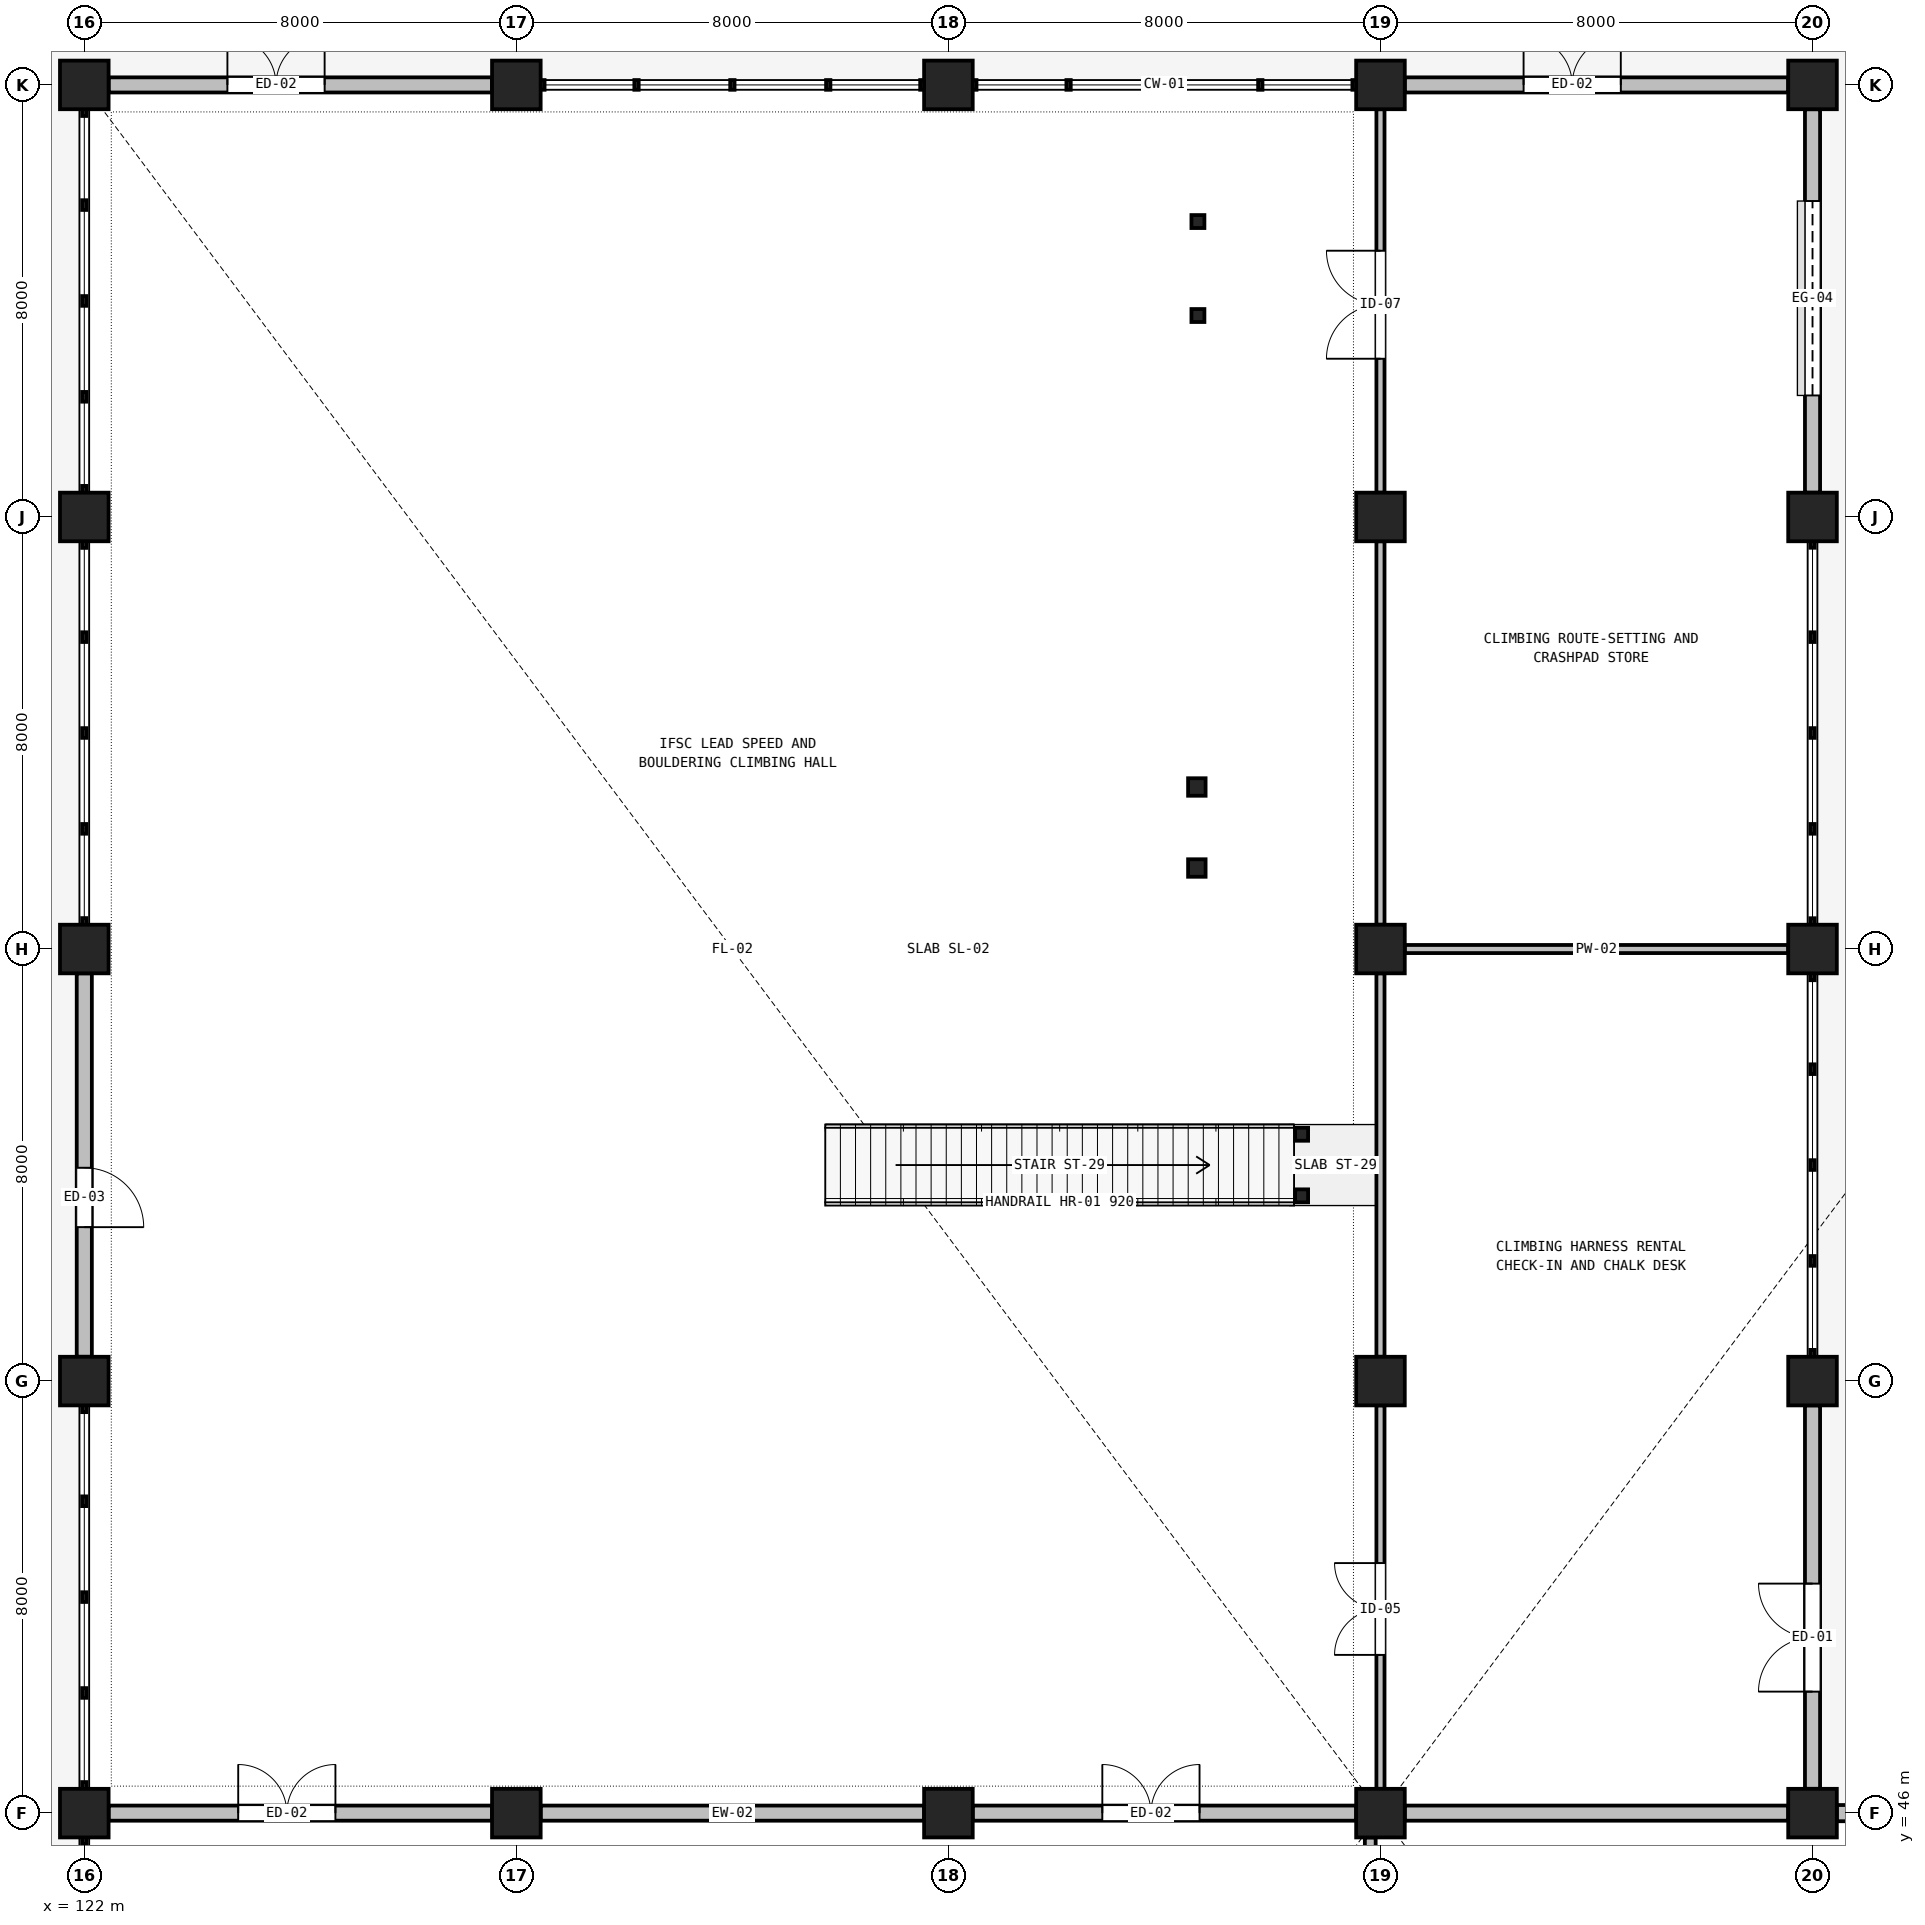
"""IFC4 building model, lengths in metres.
Left out: names, types, materials, properties, quantities, classifications, styles, units other than length and angle.
Written with IfcOpenShell. Run it as: python <this file> out.ifc"""

import sys

from ifc_helpers import new_model, si_unit, direction, frame, frame_2d, origin, origin_2d, place, context, subcontext, project, spatial, rectangle, hollow_circle, i_section, extrude, element, fill, save


model = new_model("IFC4")
c1 = context("Model", 3, precision=1e-05, world=origin(), true_north=direction((0.0, 1.0)))
c2 = subcontext(c1, "Body", "Model", "MODEL_VIEW")
j1 = project(units=[si_unit("LENGTHUNIT", "METRE"), si_unit("PLANEANGLEUNIT", "RADIAN")], contexts=[c1])
p1 = place(None, origin())
s1 = spatial("IfcSite", under=j1, at=p1, CompositionType="ELEMENT")
p2 = place(p1, origin())
s2 = spatial("IfcBuilding", under=s1, at=p2, CompositionType="ELEMENT")
p3 = place(p2, origin())
s3 = spatial("IfcBuildingStorey", under=s2, at=p3, CompositionType="ELEMENT", Elevation=0.0)
for number, where, z_axis, x_axis in (
    (1, (122.0, 46.0, 0.0), (0.0, 0.0, 1.0), (1.0, 0.0, 0.0)),
    (2, (122.0, 54.0, 0.0), (0.0, 0.0, 1.0), (1.0, 0.0, 0.0)),
    (3, (122.0, 62.0, 0.0), (0.0, 0.0, 1.0), (1.0, 0.0, 0.0)),
    (4, (122.0, 70.0, 0.0), (0.0, 0.0, 1.0), (1.0, 0.0, 0.0)),
    (5, (122.0, 78.0, 0.0), (0.0, 0.0, 1.0), (1.0, 0.0, 0.0)),
    (6, (130.0, 46.0, 0.0), (0.0, 0.0, 1.0), (1.0, 0.0, 0.0)),
    (7, (130.0, 78.0, 0.0), (0.0, 0.0, 1.0), (1.0, 0.0, 0.0)),
    (8, (138.0, 46.0, 0.0), (0.0, 0.0, 1.0), (1.0, 0.0, 0.0)),
    (9, (138.0, 78.0, 0.0), (0.0, 0.0, 1.0), (1.0, 0.0, 0.0)),
    (10, (146.0, 46.0, 0.0), (0.0, 0.0, 1.0), (1.0, 0.0, 0.0)),
    (11, (146.0, 54.0, 0.0), (0.0, 0.0, 1.0), (1.0, 0.0, 0.0)),
    (12, (146.0, 62.0, 0.0), (0.0, 0.0, 1.0), (1.0, 0.0, 0.0)),
    (13, (146.0, 70.0, 0.0), (0.0, 0.0, 1.0), (1.0, 0.0, 0.0)),
    (14, (146.0, 78.0, 0.0), (0.0, 0.0, 1.0), (1.0, 0.0, 0.0)),
    (15, (154.0, 46.0, 0.0), (0.0, 0.0, 1.0), (1.0, 0.0, 0.0)),
    (16, (154.0, 54.0, 0.0), (0.0, 0.0, 1.0), (1.0, 0.0, 0.0)),
    (17, (154.0, 62.0, 0.0), (0.0, 0.0, 1.0), (1.0, 0.0, 0.0)),
    (18, (154.0, 70.0, 0.0), (0.0, 0.0, 1.0), (1.0, 0.0, 0.0)),
    (19, (154.0, 78.0, 0.0), (0.0, 0.0, 1.0), (1.0, 0.0, 0.0)),
):
    element("IfcColumn", number, at=place(p3, frame(where, z_axis=z_axis, x_axis=x_axis)), inside=s3, PredefinedType="COLUMN", context=c2, shape_type="SweptSolid", body=[
        extrude(rectangle(XDim=0.9, YDim=0.9, at=origin_2d()), origin(), (0.0, 0.0, 1.0), 5.4),
    ])
p4 = place(p3, frame((122.45, 46.0, 0.0), z_axis=(0.0, 0.0, 1.0), x_axis=(1.0, 0.0, 0.0)))
e20 = element("IfcWall", 20, at=p4, inside=s3, PredefinedType="SOLIDWALL", context=c2, shape_type="SweptSolid", body=[
    extrude(rectangle(XDim=7.1, YDim=0.28, at=frame_2d((3.55, 0.0))), origin(), (0.0, 0.0, 1.0), 4.34),
])
p5 = place(p4, frame((2.4, 0.0, 0.0)))
e21 = element("IfcOpeningElement", 21, at=p5, cuts=e20, PredefinedType="OPENING", context=c2, shape_type="SweptSolid", body=[
    extrude(rectangle(XDim=1.8, YDim=2.3, at=frame_2d((0.9, 1.15))), frame((0.0, 0.15, 0.0), z_axis=(0.0, -1.0, 0.0), x_axis=(1.0, 0.0, 0.0)), (0.0, 0.0, 1.0), 0.3),
])
p6 = place(p3, frame((130.45, 46.0, 0.0), z_axis=(0.0, 0.0, 1.0), x_axis=(1.0, 0.0, 0.0)))
e22 = element("IfcWall", 22, at=p6, inside=s3, PredefinedType="SOLIDWALL", context=c2, shape_type="SweptSolid", body=[
    extrude(rectangle(XDim=7.1, YDim=0.28, at=frame_2d((3.55, 0.0))), origin(), (0.0, 0.0, 1.0), 4.34),
])
p7 = place(p3, frame((138.45, 46.0, 0.0), z_axis=(0.0, 0.0, 1.0), x_axis=(1.0, 0.0, 0.0)))
e23 = element("IfcWall", 23, at=p7, inside=s3, PredefinedType="SOLIDWALL", context=c2, shape_type="SweptSolid", body=[
    extrude(rectangle(XDim=7.1, YDim=0.28, at=frame_2d((3.55, 0.0))), origin(), (0.0, 0.0, 1.0), 4.42),
])
p8 = place(p7, frame((2.4, 0.0, 0.0)))
e24 = element("IfcOpeningElement", 24, at=p8, cuts=e23, PredefinedType="OPENING", context=c2, shape_type="SweptSolid", body=[
    extrude(rectangle(XDim=1.8, YDim=2.3, at=frame_2d((0.9, 1.15))), frame((0.0, 0.15, 0.0), z_axis=(0.0, -1.0, 0.0), x_axis=(1.0, 0.0, 0.0)), (0.0, 0.0, 1.0), 0.3),
])
p9 = place(p3, frame((146.45, 46.0, 0.0), z_axis=(0.0, 0.0, 1.0), x_axis=(1.0, 0.0, 0.0)))
e25 = element("IfcWall", 25, at=p9, inside=s3, PredefinedType="SOLIDWALL", context=c2, shape_type="SweptSolid", body=[
    extrude(rectangle(XDim=7.1, YDim=0.28, at=frame_2d((3.55, 0.0))), origin(), (0.0, 0.0, 1.0), 4.36),
])
p10 = place(p3, frame((154.45, 46.0, 0.0), z_axis=(0.0, 0.0, 1.0), x_axis=(1.0, 0.0, 0.0)))
e26 = element("IfcWall", 26, at=p10, inside=s3, PredefinedType="SOLIDWALL", context=c2, shape_type="SweptSolid", body=[
    extrude(rectangle(XDim=7.2, YDim=0.3, at=frame_2d((3.6, 0.0))), origin(), (0.0, 0.0, 1.0), 4.29),
])
p11 = place(p10, frame((1.8, 0.0, 0.0)))
e27 = element("IfcOpeningElement", 27, at=p11, cuts=e26, PredefinedType="OPENING", context=c2, shape_type="SweptSolid", body=[
    extrude(rectangle(XDim=3.0, YDim=2.6, at=frame_2d((1.5, 1.3))), frame((0.0, 0.16, 0.0), z_axis=(0.0, -1.0, 0.0), x_axis=(1.0, 0.0, 0.0)), (0.0, 0.0, 1.0), 0.32),
])
p12 = place(p3, frame((122.45, 78.0, 0.0), z_axis=(0.0, 0.0, 1.0), x_axis=(1.0, 0.0, 0.0)))
e28 = element("IfcWall", 28, at=p12, inside=s3, PredefinedType="SOLIDWALL", context=c2, shape_type="SweptSolid", body=[
    extrude(rectangle(XDim=7.1, YDim=0.28, at=frame_2d((3.55, 0.0))), origin(), (0.0, 0.0, 1.0), 4.39),
])
p13 = place(p12, frame((2.2, 0.0, 0.0)))
e29 = element("IfcOpeningElement", 29, at=p13, cuts=e28, PredefinedType="OPENING", context=c2, shape_type="SweptSolid", body=[
    extrude(rectangle(XDim=1.8, YDim=2.3, at=frame_2d((0.9, 1.15))), frame((0.0, 0.15, 0.0), z_axis=(0.0, -1.0, 0.0), x_axis=(1.0, 0.0, 0.0)), (0.0, 0.0, 1.0), 0.3),
])
p14 = place(p3, frame((146.45, 78.0, 0.0), z_axis=(0.0, 0.0, 1.0), x_axis=(1.0, 0.0, 0.0)))
e30 = element("IfcWall", 30, at=p14, inside=s3, PredefinedType="SOLIDWALL", context=c2, shape_type="SweptSolid", body=[
    extrude(rectangle(XDim=7.1, YDim=0.28, at=frame_2d((3.55, 0.0))), origin(), (0.0, 0.0, 1.0), 4.34),
])
p15 = place(p14, frame((2.2, 0.0, 0.0)))
e31 = element("IfcOpeningElement", 31, at=p15, cuts=e30, PredefinedType="OPENING", context=c2, shape_type="SweptSolid", body=[
    extrude(rectangle(XDim=1.8, YDim=2.3, at=frame_2d((0.9, 1.15))), frame((0.0, 0.15, 0.0), z_axis=(0.0, -1.0, 0.0), x_axis=(1.0, 0.0, 0.0)), (0.0, 0.0, 1.0), 0.3),
])
p16 = place(p3, frame((154.0, 46.45, 0.0), z_axis=(0.0, 0.0, 1.0), x_axis=(0.0, 1.0, 0.0)))
e32 = element("IfcWall", 32, at=p16, inside=s3, PredefinedType="SOLIDWALL", context=c2, shape_type="SweptSolid", body=[
    extrude(rectangle(XDim=7.1, YDim=0.28, at=frame_2d((3.55, 0.0))), origin(), (0.0, 0.0, 1.0), 4.14),
])
p17 = place(p16, frame((1.8, 0.0, 0.0)))
e33 = element("IfcOpeningElement", 33, at=p17, cuts=e32, PredefinedType="OPENING", context=c2, shape_type="SweptSolid", body=[
    extrude(rectangle(XDim=2.0, YDim=2.4, at=frame_2d((1.0, 1.2))), frame((0.0, 0.15, 0.0), z_axis=(0.0, -1.0, 0.0), x_axis=(1.0, 0.0, 0.0)), (0.0, 0.0, 1.0), 0.3),
])
p18 = place(p3, frame((122.0, 54.45, 0.0), z_axis=(0.0, 0.0, 1.0), x_axis=(0.0, 1.0, 0.0)))
e34 = element("IfcWall", 34, at=p18, inside=s3, PredefinedType="SOLIDWALL", context=c2, shape_type="SweptSolid", body=[
    extrude(rectangle(XDim=7.1, YDim=0.28, at=frame_2d((3.55, 0.0))), origin(), (0.0, 0.0, 1.0), 4.14),
])
p19 = place(p18, frame((2.4, 0.0, 0.0)))
e35 = element("IfcOpeningElement", 35, at=p19, cuts=e34, PredefinedType="OPENING", context=c2, shape_type="SweptSolid", body=[
    extrude(rectangle(XDim=1.1, YDim=2.2, at=frame_2d((0.55, 1.1))), frame((0.0, 0.15, 0.0), z_axis=(0.0, -1.0, 0.0), x_axis=(1.0, 0.0, 0.0)), (0.0, 0.0, 1.0), 0.3),
])
p20 = place(p3, frame((154.0, 70.45, 0.0), z_axis=(0.0, 0.0, 1.0), x_axis=(0.0, 1.0, 0.0)))
e36 = element("IfcWall", 36, at=p20, inside=s3, PredefinedType="SOLIDWALL", context=c2, shape_type="SweptSolid", body=[
    extrude(rectangle(XDim=7.1, YDim=0.28, at=frame_2d((3.55, 0.0))), origin(), (0.0, 0.0, 1.0), 4.49),
])
p21 = place(p20, frame((1.8, 0.0, 0.0)))
e37 = element("IfcOpeningElement", 37, at=p21, cuts=e36, PredefinedType="OPENING", context=c2, shape_type="SweptSolid", body=[
    extrude(rectangle(XDim=3.6, YDim=3.2, at=frame_2d((1.8, 1.6))), frame((0.0, 0.15, 0.0), z_axis=(0.0, -1.0, 0.0), x_axis=(1.0, 0.0, 0.0)), (0.0, 0.0, 1.0), 0.3),
])
for number, where, z_axis, x_axis in (
    (38, (142.6, 63.5, 0.0), (0.0, 0.0, 1.0), (1.0, 0.0, 0.0)),
    (39, (142.6, 65.0, 0.0), (0.0, 0.0, 1.0), (1.0, 0.0, 0.0)),
):
    element("IfcColumn", number, at=place(p3, frame(where, z_axis=z_axis, x_axis=x_axis)), inside=s3, PredefinedType="COLUMN", context=c2, shape_type="SweptSolid", body=[
        extrude(hollow_circle(Radius=0.162, WallThickness=0.012, at=origin_2d()), origin(), (0.0, 0.0, 1.0), 5.2),
    ])
for number, where, z_axis, x_axis in (
    (40, (144.54, 57.43, 0.0), (0.0, 0.0, 1.0), (1.0, 0.0, 0.0)),
    (41, (144.54, 58.57, 0.0), (0.0, 0.0, 1.0), (1.0, 0.0, 0.0)),
):
    element("IfcColumn", number, at=place(p3, frame(where, z_axis=z_axis, x_axis=x_axis)), inside=s3, PredefinedType="COLUMN", context=c2, shape_type="SweptSolid", body=[
        extrude(i_section(OverallWidth=0.24, OverallDepth=0.24, WebThickness=0.01, FlangeThickness=0.017, FilletRadius=0.021, at=origin_2d()), origin(), (0.0, 0.0, 1.0), 5.22),
    ])
for number, where, z_axis, x_axis in (
    (42, (142.62, 73.73, 0.0), (0.0, 0.0, 1.0), (1.0, 0.0, 0.0)),
    (43, (142.62, 75.47, 0.0), (0.0, 0.0, 1.0), (1.0, 0.0, 0.0)),
):
    element("IfcColumn", number, at=place(p3, frame(where, z_axis=z_axis, x_axis=x_axis)), inside=s3, PredefinedType="COLUMN", context=c2, shape_type="SweptSolid", body=[
        extrude(i_section(OverallWidth=0.24, OverallDepth=0.24, WebThickness=0.01, FlangeThickness=0.017, FilletRadius=0.021, at=origin_2d()), origin(), (0.0, 0.0, 1.0), 5.4),
    ])
p22 = place(p3, frame((145.811, 38.2, 0.0), z_axis=(0.0, 0.0, 1.0), x_axis=(0.0, 1.0, 0.0)))
e44 = element("IfcWall", 44, at=p22, inside=s3, PredefinedType="PARTITIONING", context=c2, shape_type="SweptSolid", body=[
    extrude(rectangle(XDim=7.35, YDim=0.2, at=frame_2d((3.675, 0.0))), origin(), (0.0, 0.0, 1.0), 5.1),
])
p23 = place(p3, frame((146.0, 46.45, 0.0), z_axis=(0.0, 0.0, 1.0), x_axis=(0.0, 1.0, 0.0)))
e45 = element("IfcWall", 45, at=p23, inside=s3, PredefinedType="PARTITIONING", context=c2, shape_type="SweptSolid", body=[
    extrude(rectangle(XDim=7.1, YDim=0.15, at=frame_2d((3.55, 0.0))), origin(), (0.0, 0.0, 1.0), 4.64),
])
p24 = place(p23, frame((2.48, 0.0, 0.0)))
e46 = element("IfcOpeningElement", 46, at=p24, cuts=e45, PredefinedType="OPENING", context=c2, shape_type="SweptSolid", body=[
    extrude(rectangle(XDim=1.7, YDim=2.25, at=frame_2d((0.85, 1.125))), frame((0.0, 0.085, 0.0), z_axis=(0.0, -1.0, 0.0), x_axis=(1.0, 0.0, 0.0)), (0.0, 0.0, 1.0), 0.17),
])
p25 = place(p3, frame((146.0, 54.45, 0.0), z_axis=(0.0, 0.0, 1.0), x_axis=(0.0, 1.0, 0.0)))
e47 = element("IfcWall", 47, at=p25, inside=s3, PredefinedType="PARTITIONING", context=c2, shape_type="SweptSolid", body=[
    extrude(rectangle(XDim=7.1, YDim=0.15, at=frame_2d((3.55, 0.0))), origin(), (0.0, 0.0, 1.0), 4.54),
])
p26 = place(p3, frame((146.0, 62.45, 0.0), z_axis=(0.0, 0.0, 1.0), x_axis=(0.0, 1.0, 0.0)))
e48 = element("IfcWall", 48, at=p26, inside=s3, PredefinedType="PARTITIONING", context=c2, shape_type="SweptSolid", body=[
    extrude(rectangle(XDim=7.1, YDim=0.15, at=frame_2d((3.55, 0.0))), origin(), (0.0, 0.0, 1.0), 4.44),
])
p27 = place(p3, frame((146.0, 70.45, 0.0), z_axis=(0.0, 0.0, 1.0), x_axis=(0.0, 1.0, 0.0)))
e49 = element("IfcWall", 49, at=p27, inside=s3, PredefinedType="PARTITIONING", context=c2, shape_type="SweptSolid", body=[
    extrude(rectangle(XDim=7.1, YDim=0.15, at=frame_2d((3.55, 0.0))), origin(), (0.0, 0.0, 1.0), 4.34),
])
p28 = place(p27, frame((2.48, 0.0, 0.0)))
e50 = element("IfcOpeningElement", 50, at=p28, cuts=e49, PredefinedType="OPENING", context=c2, shape_type="SweptSolid", body=[
    extrude(rectangle(XDim=2.0, YDim=2.4, at=frame_2d((1.0, 1.2))), frame((0.0, 0.085, 0.0), z_axis=(0.0, -1.0, 0.0), x_axis=(1.0, 0.0, 0.0)), (0.0, 0.0, 1.0), 0.17),
])
p29 = place(p3, frame((146.45, 62.0, 0.0), z_axis=(0.0, 0.0, 1.0), x_axis=(1.0, 0.0, 0.0)))
e51 = element("IfcWall", 51, at=p29, inside=s3, PredefinedType="PARTITIONING", context=c2, shape_type="SweptSolid", body=[
    extrude(rectangle(XDim=7.1, YDim=0.15, at=frame_2d((3.55, 0.0))), origin(), (0.0, 0.0, 1.0), 4.34),
])
p30 = place(p5, origin())
e52 = element("IfcDoor", 52, at=p30, inside=s3, OperationType="DOUBLE_DOOR_SINGLE_SWING", PredefinedType="DOOR", context=c2, shape_type="SweptSolid", body=[
    extrude(rectangle(XDim=1.8, YDim=2.3, at=frame_2d((0.9, 1.15))), frame((0.0, 0.025, 0.0), z_axis=(0.0, -1.0, 0.0), x_axis=(1.0, 0.0, 0.0)), (0.0, 0.0, 1.0), 0.05),
])
fill(e21, e52)
p31 = place(p8, origin())
e53 = element("IfcDoor", 53, at=p31, inside=s3, OperationType="DOUBLE_DOOR_SINGLE_SWING", PredefinedType="DOOR", context=c2, shape_type="SweptSolid", body=[
    extrude(rectangle(XDim=1.8, YDim=2.3, at=frame_2d((0.9, 1.15))), frame((0.0, 0.025, 0.0), z_axis=(0.0, -1.0, 0.0), x_axis=(1.0, 0.0, 0.0)), (0.0, 0.0, 1.0), 0.05),
])
fill(e24, e53)
p32 = place(p13, origin())
e54 = element("IfcDoor", 54, at=p32, inside=s3, OperationType="DOUBLE_DOOR_SINGLE_SWING", PredefinedType="DOOR", context=c2, shape_type="SweptSolid", body=[
    extrude(rectangle(XDim=1.8, YDim=2.3, at=frame_2d((0.9, 1.15))), frame((0.0, 0.025, 0.0), z_axis=(0.0, -1.0, 0.0), x_axis=(1.0, 0.0, 0.0)), (0.0, 0.0, 1.0), 0.05),
])
fill(e29, e54)
p33 = place(p15, origin())
e55 = element("IfcDoor", 55, at=p33, inside=s3, OperationType="DOUBLE_DOOR_SINGLE_SWING", PredefinedType="DOOR", context=c2, shape_type="SweptSolid", body=[
    extrude(rectangle(XDim=1.8, YDim=2.3, at=frame_2d((0.9, 1.15))), frame((0.0, 0.025, 0.0), z_axis=(0.0, -1.0, 0.0), x_axis=(1.0, 0.0, 0.0)), (0.0, 0.0, 1.0), 0.05),
])
fill(e31, e55)
p34 = place(p17, origin())
e56 = element("IfcDoor", 56, at=p34, inside=s3, OperationType="DOUBLE_DOOR_SINGLE_SWING", PredefinedType="DOOR", context=c2, shape_type="SweptSolid", body=[
    extrude(rectangle(XDim=2.0, YDim=2.4, at=frame_2d((1.0, 1.2))), frame((0.0, 0.025, 0.0), z_axis=(0.0, -1.0, 0.0), x_axis=(1.0, 0.0, 0.0)), (0.0, 0.0, 1.0), 0.05),
])
fill(e33, e56)
p35 = place(p19, frame((1.1, 0.0, 0.0), z_axis=(0.0, 0.0, 1.0), x_axis=(-1.0, 0.0, 0.0)))
e57 = element("IfcDoor", 57, at=p35, inside=s3, OperationType="SINGLE_SWING_LEFT", PredefinedType="DOOR", context=c2, shape_type="SweptSolid", body=[
    extrude(rectangle(XDim=1.1, YDim=2.2, at=frame_2d((0.55, 1.1))), frame((0.0, 0.025, 0.0), z_axis=(0.0, -1.0, 0.0), x_axis=(1.0, 0.0, 0.0)), (0.0, 0.0, 1.0), 0.05),
])
fill(e35, e57)
p36 = place(p21, origin())
e58 = element("IfcDoor", 58, at=p36, inside=s3, OperationType="ROLLINGUP", PredefinedType="GATE", context=c2, shape_type="SweptSolid", body=[
    extrude(rectangle(XDim=3.6, YDim=3.2, at=frame_2d((1.8, 1.6))), frame((0.0, 0.025, 0.0), z_axis=(0.0, -1.0, 0.0), x_axis=(1.0, 0.0, 0.0)), (0.0, 0.0, 1.0), 0.05),
])
fill(e37, e58)
p37 = place(p24, origin())
e59 = element("IfcDoor", 59, at=p37, inside=s3, OperationType="DOUBLE_DOOR_SINGLE_SWING", PredefinedType="DOOR", context=c2, shape_type="SweptSolid", body=[
    extrude(rectangle(XDim=1.7, YDim=2.25, at=frame_2d((0.85, 1.125))), frame((0.0, 0.025, 0.0), z_axis=(0.0, -1.0, 0.0), x_axis=(1.0, 0.0, 0.0)), (0.0, 0.0, 1.0), 0.05),
])
fill(e46, e59)
p38 = place(p28, origin())
e60 = element("IfcDoor", 60, at=p38, inside=s3, OperationType="DOUBLE_DOOR_SINGLE_SWING", PredefinedType="DOOR", context=c2, shape_type="SweptSolid", body=[
    extrude(rectangle(XDim=2.0, YDim=2.4, at=frame_2d((1.0, 1.2))), frame((0.0, 0.025, 0.0), z_axis=(0.0, -1.0, 0.0), x_axis=(1.0, 0.0, 0.0)), (0.0, 0.0, 1.0), 0.05),
])
fill(e50, e60)
save(model, sys.argv[1])
